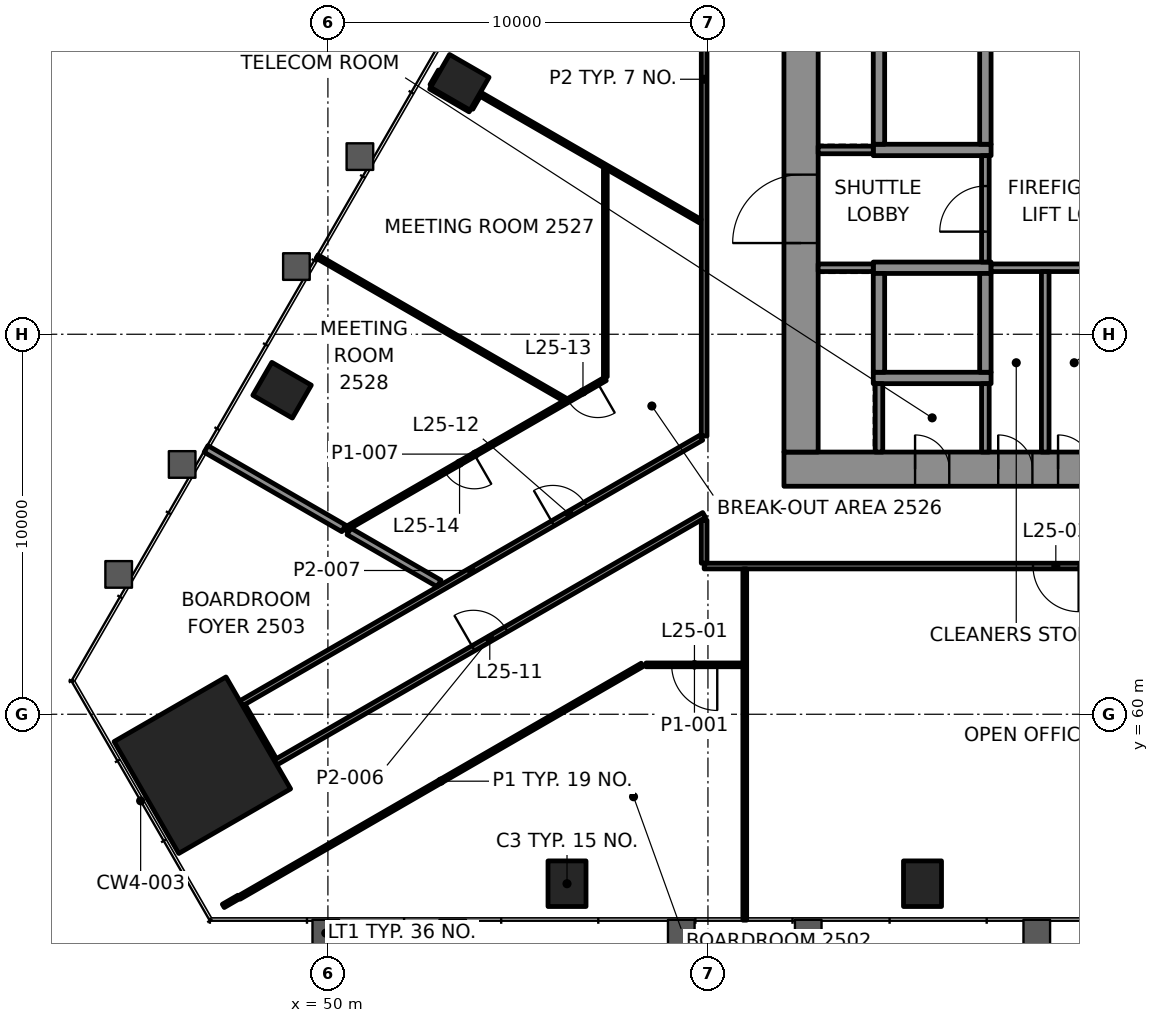
"""IFC4 building model, lengths in metres.
Left out: names, types, materials, properties, quantities, classifications, styles, units other than length and angle.
Written with IfcOpenShell. Run it as: python <this file> out.ifc"""

import sys

from ifc_helpers import new_model, si_unit, direction, frame, frame_2d, origin, origin_2d, place, context, subcontext, project, spatial, rectangle, extrude, element, fill, save


model = new_model("IFC4")
c1 = context("Model", 3, precision=1e-05, world=origin(), true_north=direction((0.0, 1.0)))
c2 = subcontext(c1, "Body", "Model", "MODEL_VIEW")
j1 = project(units=[si_unit("LENGTHUNIT", "METRE"), si_unit("PLANEANGLEUNIT", "RADIAN")], contexts=[c1])
p1 = place(None, origin())
s1 = spatial("IfcSite", under=j1, at=p1, CompositionType="ELEMENT")
p2 = place(p1, origin())
s2 = spatial("IfcBuilding", under=s1, at=p2, CompositionType="ELEMENT")
p3 = place(p2, frame((0.0, 0.0, 111.4)))
s3 = spatial("IfcBuildingStorey", under=s2, at=p3, CompositionType="ELEMENT", Elevation=111.4)
p4 = place(p3, frame((46.696, 58.659, 0.0), z_axis=(0.0, 0.0, 1.0), x_axis=(0.5, -0.866025403784, 0.0)))
e1 = element("IfcColumn", 1, at=p4, inside=s3, PredefinedType="COLUMN", context=c2, shape_type="SweptSolid", body=[
    extrude(rectangle(XDim=3.4, YDim=3.4, at=origin_2d()), origin(), (0.0, 0.0, 1.0), 4.2),
])
for number, where, z_axis, x_axis in (
    (2, (56.292, 55.541, -0.0), (0.0, 0.0, 1.0), (1.0, 0.0, 0.0)),
    (3, (65.646, 55.541, -0.0), (0.0, 0.0, 1.0), (1.0, 0.0, 0.0)),
    (4, (53.471, 76.628, -0.0), (0.0, 0.0, 1.0), (-0.5, -0.866, 0.0)),
    (5, (48.794, 68.528, -0.0), (0.0, 0.0, 1.0), (-0.5, -0.866, 0.0)),
):
    element("IfcColumn", number, at=place(p3, frame(where, z_axis=z_axis, x_axis=x_axis)), inside=s3, PredefinedType="COLUMN", context=c2, shape_type="SweptSolid", body=[
        extrude(rectangle(XDim=1.0, YDim=1.2, at=origin_2d()), origin(), (0.0, 0.0, 1.0), 4.2),
    ])
p5 = place(p3, frame((62.0, 66.45, 0.0), z_axis=(0.0, 0.0, 1.0), x_axis=(1.0, 0.0, 0.0)))
e6 = element("IfcWall", 6, at=p5, inside=s3, PredefinedType="SHEAR", context=c2, shape_type="SweptSolid", body=[
    extrude(rectangle(XDim=26.0, YDim=0.9, at=frame_2d((13.0, 0.0))), origin(), (0.0, 0.0, 1.0), 4.0),
])
p6 = place(p5, frame((3.45, 0.0, 0.0)))
e7 = element("IfcOpeningElement", 7, at=p6, cuts=e6, PredefinedType="OPENING", context=c2, shape_type="SweptSolid", body=[
    extrude(rectangle(XDim=0.9, YDim=2.1, at=frame_2d((0.45, 1.05))), frame((0.0, 0.46, 0.0), z_axis=(0.0, -1.0, 0.0), x_axis=(1.0, 0.0, 0.0)), (0.0, 0.0, 1.0), 0.92),
])
p7 = place(p5, frame((5.637, 0.0, 0.0)))
e8 = element("IfcOpeningElement", 8, at=p7, cuts=e6, PredefinedType="OPENING", context=c2, shape_type="SweptSolid", body=[
    extrude(rectangle(XDim=0.9, YDim=2.1, at=frame_2d((0.45, 1.05))), frame((0.0, 0.46, 0.0), z_axis=(0.0, -1.0, 0.0), x_axis=(1.0, 0.0, 0.0)), (0.0, 0.0, 1.0), 0.92),
])
p8 = place(p5, frame((7.212, 0.0, 0.0)))
e9 = element("IfcOpeningElement", 9, at=p8, cuts=e6, PredefinedType="OPENING", context=c2, shape_type="SweptSolid", body=[
    extrude(rectangle(XDim=0.9, YDim=2.1, at=frame_2d((0.45, 1.05))), frame((0.0, 0.46, 0.0), z_axis=(0.0, -1.0, 0.0), x_axis=(1.0, 0.0, 0.0)), (0.0, 0.0, 1.0), 0.92),
])
p9 = place(p5, frame((8.999, 0.0, 0.0)))
e10 = element("IfcOpeningElement", 10, at=p9, cuts=e6, PredefinedType="OPENING", context=c2, shape_type="SweptSolid", body=[
    extrude(rectangle(XDim=0.9, YDim=2.1, at=frame_2d((0.45, 1.05))), frame((0.0, 0.46, 0.0), z_axis=(0.0, -1.0, 0.0), x_axis=(1.0, 0.0, 0.0)), (0.0, 0.0, 1.0), 0.92),
])
p10 = place(p5, frame((17.324, 0.0, 0.0)))
e11 = element("IfcOpeningElement", 11, at=p10, cuts=e6, PredefinedType="OPENING", context=c2, shape_type="SweptSolid", body=[
    extrude(rectangle(XDim=0.9, YDim=2.1, at=frame_2d((0.45, 1.05))), frame((0.0, 0.46, 0.0), z_axis=(0.0, -1.0, 0.0), x_axis=(1.0, 0.0, 0.0)), (0.0, 0.0, 1.0), 0.92),
])
p11 = place(p3, frame((62.45, 66.9, 0.0), z_axis=(0.0, 0.0, 1.0), x_axis=(0.0, 1.0, 0.0)))
e12 = element("IfcWall", 12, at=p11, inside=s3, PredefinedType="SHEAR", context=c2, shape_type="SweptSolid", body=[
    extrude(rectangle(XDim=16.2, YDim=0.9, at=frame_2d((8.1, 0.0))), origin(), (0.0, 0.0, 1.0), 4.0),
])
p12 = place(p11, frame((5.5, 0.0, 0.0)))
e13 = element("IfcOpeningElement", 13, at=p12, cuts=e12, PredefinedType="OPENING", context=c2, shape_type="SweptSolid", body=[
    extrude(rectangle(XDim=1.8, YDim=2.1, at=frame_2d((0.9, 1.05))), frame((0.0, 0.46, 0.0), z_axis=(0.0, -1.0, 0.0), x_axis=(1.0, 0.0, 0.0)), (0.0, 0.0, 1.0), 0.92),
])
for number, where, z_axis, x_axis in (
    (14, (64.35, 68.85, 0.0), (0.0, 0.0, 1.0), (1.0, 0.0, 0.0)),
    (15, (64.35, 71.75, 0.0), (0.0, 0.0, 1.0), (1.0, 0.0, 0.0)),
    (16, (64.35, 74.85, 0.0), (0.0, 0.0, 1.0), (1.0, 0.0, 0.0)),
):
    element("IfcWall", number, at=place(p3, frame(where, z_axis=z_axis, x_axis=x_axis)), inside=s3, PredefinedType="SHEAR", context=c2, shape_type="SweptSolid", body=[
        extrude(rectangle(XDim=3.1, YDim=0.3, at=frame_2d((1.55, 0.0))), origin(), (0.0, 0.0, 1.0), 4.0),
    ])
for number, where, z_axis, x_axis in (
    (17, (64.5, 69.0, 0.0), (0.0, 0.0, 1.0), (0.0, 1.0, 0.0)),
    (18, (64.5, 75.0, 0.0), (0.0, 0.0, 1.0), (0.0, 1.0, 0.0)),
    (19, (67.3, 69.0, 0.0), (0.0, 0.0, 1.0), (0.0, 1.0, 0.0)),
    (20, (67.3, 75.0, 0.0), (0.0, 0.0, 1.0), (0.0, 1.0, 0.0)),
):
    element("IfcWall", number, at=place(p3, frame(where, z_axis=z_axis, x_axis=x_axis)), inside=s3, PredefinedType="SHEAR", context=c2, shape_type="SweptSolid", body=[
        extrude(rectangle(XDim=2.6, YDim=0.3, at=frame_2d((1.3, 0.0))), origin(), (0.0, 0.0, 1.0), 4.0),
    ])
p13 = place(p3, frame((60.919, 61.3, 0.0), z_axis=(0.0, 0.0, 1.0), x_axis=(-1.0, 0.0, 0.0)))
e21 = element("IfcWall", 21, at=p13, inside=s3, PredefinedType="PARTITIONING", context=c2, shape_type="SweptSolid", body=[
    extrude(rectangle(XDim=2.548, YDim=0.1, at=frame_2d((1.274, 0.0))), origin(), (0.0, 0.0, 1.0), 3.4),
])
p14 = place(p13, frame((0.674, 0.0, 0.0)))
e22 = element("IfcOpeningElement", 22, at=p14, cuts=e21, PredefinedType="OPENING", context=c2, shape_type="SweptSolid", body=[
    extrude(rectangle(XDim=1.2, YDim=2.1, at=frame_2d((0.6, 1.05))), frame((0.0, 0.06, 0.0), z_axis=(0.0, -1.0, 0.0), x_axis=(1.0, 0.0, 0.0)), (0.0, 0.0, 1.0), 0.12),
])
p15 = place(p3, frame((90.099, 63.9, 0.0), z_axis=(0.0, 0.0, 1.0), x_axis=(-1.0, 0.0, 0.0)))
e23 = element("IfcWall", 23, at=p15, inside=s3, PredefinedType="PARTITIONING", context=c2, shape_type="SweptSolid", body=[
    extrude(rectangle(XDim=30.199, YDim=0.15, at=frame_2d((15.099, 0.0))), origin(), (0.0, 0.0, 1.0), 3.4),
])
p16 = place(p15, frame((5.882, 0.0, 0.0)))
e24 = element("IfcOpeningElement", 24, at=p16, cuts=e23, PredefinedType="OPENING", context=c2, shape_type="SweptSolid", body=[
    extrude(rectangle(XDim=1.2, YDim=2.1, at=frame_2d((0.6, 1.05))), frame((0.0, 0.085, 0.0), z_axis=(0.0, -1.0, 0.0), x_axis=(1.0, 0.0, 0.0)), (0.0, 0.0, 1.0), 0.17),
])
p17 = place(p15, frame((20.346, 0.0, 0.0)))
e25 = element("IfcOpeningElement", 25, at=p17, cuts=e23, PredefinedType="OPENING", context=c2, shape_type="SweptSolid", body=[
    extrude(rectangle(XDim=1.2, YDim=2.1, at=frame_2d((0.6, 1.05))), frame((0.0, 0.085, 0.0), z_axis=(0.0, -1.0, 0.0), x_axis=(1.0, 0.0, 0.0)), (0.0, 0.0, 1.0), 0.17),
])
p18 = place(p3, frame((47.667, 55.178, 0.0), z_axis=(0.0, 0.0, 1.0), x_axis=(0.866022223021, 0.500005509203, 0.0)))
e26 = element("IfcWall", 26, at=p18, inside=s3, PredefinedType="PARTITIONING", context=c2, shape_type="SweptSolid", body=[
    extrude(rectangle(XDim=12.244, YDim=0.1, at=frame_2d((6.122, 0.0))), origin(), (0.0, 0.0, 1.0), 3.4),
])
p19 = place(p3, frame((47.248, 54.958, 0.0), z_axis=(0.0, 0.0, 1.0), x_axis=(0.865944638795, 0.50013986298, 0.0)))
e27 = element("IfcWall", 27, at=p19, inside=s3, PredefinedType="PARTITIONING", context=c2, shape_type="SweptSolid", body=[
    extrude(rectangle(XDim=0.472, YDim=0.1, at=frame_2d((0.236, 0.0))), origin(), (0.0, 0.0, 1.0), 3.4),
])
p20 = place(p3, frame((48.619, 58.73, 0.0), z_axis=(0.0, 0.0, 1.0), x_axis=(0.866022351388, 0.500005286868, 0.0)))
e28 = element("IfcWall", 28, at=p20, inside=s3, PredefinedType="PARTITIONING", context=c2, shape_type="SweptSolid", body=[
    extrude(rectangle(XDim=13.026, YDim=0.15, at=frame_2d((6.513, 0.0))), origin(), (0.0, 0.0, 1.0), 3.247),
])
p21 = place(p20, frame((6.013, 0.0, 0.0)))
e29 = element("IfcOpeningElement", 29, at=p21, cuts=e28, PredefinedType="OPENING", context=c2, shape_type="SweptSolid", body=[
    extrude(rectangle(XDim=1.0, YDim=2.1, at=frame_2d((0.5, 1.05))), frame((0.0, 0.085, 0.0), z_axis=(0.0, -1.0, 0.0), x_axis=(1.0, 0.0, 0.0)), (0.0, 0.0, 1.0), 0.17),
])
p22 = place(p3, frame((47.719, 60.289, 0.0), z_axis=(0.0, 0.0, 1.0), x_axis=(0.866025916507, 0.499999111938, 0.0)))
e30 = element("IfcWall", 30, at=p22, inside=s3, PredefinedType="PARTITIONING", context=c2, shape_type="SweptSolid", body=[
    extrude(rectangle(XDim=13.979, YDim=0.15, at=frame_2d((6.99, 0.0))), origin(), (0.0, 0.0, 1.0), 3.4),
])
p23 = place(p22, frame((9.467, 0.0, 0.0)))
e31 = element("IfcOpeningElement", 31, at=p23, cuts=e30, PredefinedType="OPENING", context=c2, shape_type="SweptSolid", body=[
    extrude(rectangle(XDim=1.0, YDim=2.1, at=frame_2d((0.5, 1.05))), frame((0.0, 0.085, 0.0), z_axis=(0.0, -1.0, 0.0), x_axis=(1.0, 0.0, 0.0)), (0.0, 0.0, 1.0), 0.17),
])
p24 = place(p3, frame((57.3, 68.823, 0.0), z_axis=(0.0, 0.0, 1.0), x_axis=(-0.866030292833, -0.499991531824, 0.0)))
e32 = element("IfcWall", 32, at=p24, inside=s3, PredefinedType="PARTITIONING", context=c2, shape_type="SweptSolid", body=[
    extrude(rectangle(XDim=7.906, YDim=0.1, at=frame_2d((3.953, 0.0))), origin(), (0.0, 0.0, 1.0), 3.4),
])
p25 = place(p24, frame((0.229, 0.0, 0.0)))
e33 = element("IfcOpeningElement", 33, at=p25, cuts=e32, PredefinedType="OPENING", context=c2, shape_type="SweptSolid", body=[
    extrude(rectangle(XDim=0.9, YDim=2.1, at=frame_2d((0.45, 1.05))), frame((0.0, 0.06, 0.0), z_axis=(0.0, -1.0, 0.0), x_axis=(1.0, 0.0, 0.0)), (0.0, 0.0, 1.0), 0.12),
])
p26 = place(p24, frame((3.979, 0.0, 0.0)))
e34 = element("IfcOpeningElement", 34, at=p26, cuts=e32, PredefinedType="OPENING", context=c2, shape_type="SweptSolid", body=[
    extrude(rectangle(XDim=0.9, YDim=2.1, at=frame_2d((0.45, 1.05))), frame((0.0, 0.06, 0.0), z_axis=(0.0, -1.0, 0.0), x_axis=(1.0, 0.0, 0.0)), (0.0, 0.0, 1.0), 0.12),
])
p27 = place(p3, frame((53.771, 75.948, 0.0), z_axis=(0.0, 0.0, 1.0), x_axis=(0.500246304613, 0.865883153041, 0.0)))
e35 = element("IfcWall", 35, at=p27, inside=s3, PredefinedType="PARTITIONING", context=c2, shape_type="SweptSolid", body=[
    extrude(rectangle(XDim=0.39, YDim=0.1, at=frame_2d((0.195, 0.0))), origin(), (0.0, 0.0, 1.0), 3.4),
])
p28 = place(p3, frame((52.73, 76.545, 0.0), z_axis=(0.0, 0.0, 1.0), x_axis=(0.49999285859, 0.86602952684, 0.0)))
e36 = element("IfcWall", 36, at=p28, inside=s3, PredefinedType="PARTITIONING", context=c2, shape_type="SweptSolid", body=[
    extrude(rectangle(XDim=0.443, YDim=0.1, at=frame_2d((0.221, 0.0))), origin(), (0.0, 0.0, 1.0), 3.4),
])
p29 = place(p3, frame((60.969, 54.581, 0.0), z_axis=(0.0, 0.0, 1.0), x_axis=(0.0, 1.0, 0.0)))
e37 = element("IfcWall", 37, at=p29, inside=s3, PredefinedType="PARTITIONING", context=c2, shape_type="SweptSolid", body=[
    extrude(rectangle(XDim=9.244, YDim=0.1, at=frame_2d((4.622, 0.0))), origin(), (0.0, 0.0, 1.0), 3.165),
])
p30 = place(p3, frame((59.9, 63.976, 0.0), z_axis=(0.0, 0.0, 1.0), x_axis=(0.0, 1.0, 0.0)))
e38 = element("IfcWall", 38, at=p30, inside=s3, PredefinedType="PARTITIONING", context=c2, shape_type="SweptSolid", body=[
    extrude(rectangle(XDim=1.131, YDim=0.15, at=frame_2d((0.565, 0.0))), origin(), (0.0, 0.0, 1.0), 3.247),
])
p31 = place(p3, frame((59.9, 67.321, 0.0), z_axis=(0.0, 0.0, 1.0), x_axis=(0.0, 1.0, 0.0)))
e39 = element("IfcWall", 39, at=p31, inside=s3, PredefinedType="PARTITIONING", context=c2, shape_type="SweptSolid", body=[
    extrude(rectangle(XDim=18.778, YDim=0.15, at=frame_2d((9.389, 0.0))), origin(), (0.0, 0.0, 1.0), 3.4),
])
p32 = place(p3, frame((57.3, 68.88, 0.0), z_axis=(0.0, 0.0, 1.0), x_axis=(0.0, 1.0, 0.0)))
e40 = element("IfcWall", 40, at=p32, inside=s3, PredefinedType="PARTITIONING", context=c2, shape_type="SweptSolid", body=[
    extrude(rectangle(XDim=5.45, YDim=0.1, at=frame_2d((2.725, 0.0))), origin(), (0.0, 0.0, 1.0), 3.4),
])
p33 = place(p3, frame((48.58, 58.794, 0.0), z_axis=(0.0, 0.0, 1.0), x_axis=(-0.499944585209, 0.866057395165, 0.0)))
e41 = element("IfcWall", 41, at=p33, inside=s3, PredefinedType="PARTITIONING", context=c2, shape_type="SweptSolid", body=[
    extrude(rectangle(XDim=1.649, YDim=0.15, at=frame_2d((0.825, 0.0))), origin(), (0.0, 0.0, 1.0), 3.247),
])
p34 = place(p3, frame((59.799, 72.975, 0.0), z_axis=(0.0, 0.0, 1.0), x_axis=(-0.866037071789, 0.499979789879, 0.0)))
e42 = element("IfcWall", 42, at=p34, inside=s3, PredefinedType="PARTITIONING", context=c2, shape_type="SweptSolid", body=[
    extrude(rectangle(XDim=6.707, YDim=0.1, at=frame_2d((3.354, 0.0))), origin(), (0.0, 0.0, 1.0), 3.4),
])
p35 = place(p3, frame((53.741, 75.896, 0.0), z_axis=(0.0, 0.0, 1.0), x_axis=(-0.866094119867, 0.499880961361, 0.0)))
e43 = element("IfcWall", 43, at=p35, inside=s3, PredefinedType="PARTITIONING", context=c2, shape_type="SweptSolid", body=[
    extrude(rectangle(XDim=1.2, YDim=0.1, at=frame_2d((0.6, 0.0))), origin(), (0.0, 0.0, 1.0), 3.165),
])
p36 = place(p3, frame((56.223, 68.288, 0.0), z_axis=(0.0, 0.0, 1.0), x_axis=(-0.866018922649, 0.500011225488, 0.0)))
e44 = element("IfcWall", 44, at=p36, inside=s3, PredefinedType="PARTITIONING", context=c2, shape_type="SweptSolid", body=[
    extrude(rectangle(XDim=7.513, YDim=0.1, at=frame_2d((3.757, 0.0))), origin(), (0.0, 0.0, 1.0), 3.165),
])
p37 = place(p3, frame((52.926, 63.441, 0.0), z_axis=(0.0, 0.0, 1.0), x_axis=(-0.866019409031, 0.500010383074, 0.0)))
e45 = element("IfcWall", 45, at=p37, inside=s3, PredefinedType="PARTITIONING", context=c2, shape_type="SweptSolid", body=[
    extrude(rectangle(XDim=2.74, YDim=0.2, at=frame_2d((1.37, 0.0))), origin(), (0.0, 0.0, 1.0), 3.4),
])
p38 = place(p3, frame((50.416, 64.891, 0.0), z_axis=(0.0, 0.0, 1.0), x_axis=(-0.866054366634, 0.499949831517, 0.0)))
e46 = element("IfcWall", 46, at=p38, inside=s3, PredefinedType="PARTITIONING", context=c2, shape_type="SweptSolid", body=[
    extrude(rectangle(XDim=4.183, YDim=0.2, at=frame_2d((2.091, 0.0))), origin(), (0.0, 0.0, 1.0), 3.4),
])
p39 = place(p3, frame((62.9, 71.75, 0.0), z_axis=(0.0, 0.0, 1.0), x_axis=(1.0, 0.0, 0.0)))
e47 = element("IfcWall", 47, at=p39, inside=s3, PredefinedType="PARTITIONING", context=c2, shape_type="SweptSolid", body=[
    extrude(rectangle(XDim=1.45, YDim=0.2, at=frame_2d((0.725, 0.0))), origin(), (0.0, 0.0, 1.0), 4.0),
])
p40 = place(p3, frame((67.45, 71.75, 0.0), z_axis=(0.0, 0.0, 1.0), x_axis=(1.0, 0.0, 0.0)))
e48 = element("IfcWall", 48, at=p40, inside=s3, PredefinedType="PARTITIONING", context=c2, shape_type="SweptSolid", body=[
    extrude(rectangle(XDim=2.85, YDim=0.2, at=frame_2d((1.425, 0.0))), origin(), (0.0, 0.0, 1.0), 4.0),
])
p41 = place(p3, frame((62.9, 74.85, 0.0), z_axis=(0.0, 0.0, 1.0), x_axis=(1.0, 0.0, 0.0)))
e49 = element("IfcWall", 49, at=p41, inside=s3, PredefinedType="PARTITIONING", context=c2, shape_type="SweptSolid", body=[
    extrude(rectangle(XDim=1.45, YDim=0.2, at=frame_2d((0.725, 0.0))), origin(), (0.0, 0.0, 1.0), 4.0),
])
for number, where, z_axis, x_axis in (
    (50, (64.5, 66.9, 0.0), (0.0, 0.0, 1.0), (0.0, 1.0, 0.0)),
    (51, (67.3, 66.9, 0.0), (0.0, 0.0, 1.0), (0.0, 1.0, 0.0)),
):
    element("IfcWall", number, at=place(p3, frame(where, z_axis=z_axis, x_axis=x_axis)), inside=s3, PredefinedType="PARTITIONING", context=c2, shape_type="SweptSolid", body=[
        extrude(rectangle(XDim=1.8, YDim=0.2, at=frame_2d((0.9, 0.0))), origin(), (0.0, 0.0, 1.0), 4.0),
    ])
p42 = place(p3, frame((67.3, 71.9, 0.0), z_axis=(0.0, 0.0, 1.0), x_axis=(0.0, 1.0, 0.0)))
e52 = element("IfcWall", 52, at=p42, inside=s3, PredefinedType="PARTITIONING", context=c2, shape_type="SweptSolid", body=[
    extrude(rectangle(XDim=2.8, YDim=0.2, at=frame_2d((1.4, 0.0))), origin(), (0.0, 0.0, 1.0), 4.0),
])
p43 = place(p42, frame((0.8, 0.0, 0.0)))
e53 = element("IfcOpeningElement", 53, at=p43, cuts=e52, PredefinedType="OPENING", context=c2, shape_type="SweptSolid", body=[
    extrude(rectangle(XDim=1.2, YDim=2.1, at=frame_2d((0.6, 1.05))), frame((0.0, 0.11, 0.0), z_axis=(0.0, -1.0, 0.0), x_axis=(1.0, 0.0, 0.0)), (0.0, 0.0, 1.0), 0.22),
])
p44 = place(p3, frame((68.875, 66.9, 0.0), z_axis=(0.0, 0.0, 1.0), x_axis=(0.0, 1.0, 0.0)))
e54 = element("IfcWall", 54, at=p44, inside=s3, PredefinedType="PARTITIONING", context=c2, shape_type="SweptSolid", body=[
    extrude(rectangle(XDim=4.75, YDim=0.2, at=frame_2d((2.375, 0.0))), origin(), (0.0, 0.0, 1.0), 4.0),
])
p45 = place(p14, origin())
e55 = element("IfcDoor", 55, at=p45, inside=s3, OperationType="DOUBLE_DOOR_SINGLE_SWING", PredefinedType="DOOR", context=c2, shape_type="SweptSolid", body=[
    extrude(rectangle(XDim=1.2, YDim=2.1, at=frame_2d((0.6, 1.05))), frame((0.0, 0.025, 0.0), z_axis=(0.0, -1.0, 0.0), x_axis=(1.0, 0.0, 0.0)), (0.0, 0.0, 1.0), 0.05),
])
fill(e22, e55)
p46 = place(p17, origin())
e56 = element("IfcDoor", 56, at=p46, inside=s3, OperationType="DOUBLE_DOOR_SINGLE_SWING", PredefinedType="DOOR", context=c2, shape_type="SweptSolid", body=[
    extrude(rectangle(XDim=1.2, YDim=2.1, at=frame_2d((0.6, 1.05))), frame((0.0, 0.025, 0.0), z_axis=(0.0, -1.0, 0.0), x_axis=(1.0, 0.0, 0.0)), (0.0, 0.0, 1.0), 0.05),
])
fill(e25, e56)
p47 = place(p21, origin())
e57 = element("IfcDoor", 57, at=p47, inside=s3, OperationType="SINGLE_SWING_RIGHT", PredefinedType="DOOR", context=c2, shape_type="SweptSolid", body=[
    extrude(rectangle(XDim=1.0, YDim=2.1, at=frame_2d((0.5, 1.05))), frame((0.0, 0.025, 0.0), z_axis=(0.0, -1.0, 0.0), x_axis=(1.0, 0.0, 0.0)), (0.0, 0.0, 1.0), 0.05),
])
fill(e29, e57)
p48 = place(p23, origin())
e58 = element("IfcDoor", 58, at=p48, inside=s3, OperationType="SINGLE_SWING_LEFT", PredefinedType="DOOR", context=c2, shape_type="SweptSolid", body=[
    extrude(rectangle(XDim=1.0, YDim=2.1, at=frame_2d((0.5, 1.05))), frame((0.0, 0.025, 0.0), z_axis=(0.0, -1.0, 0.0), x_axis=(1.0, 0.0, 0.0)), (0.0, 0.0, 1.0), 0.05),
])
fill(e31, e58)
p49 = place(p25, origin())
e59 = element("IfcDoor", 59, at=p49, inside=s3, OperationType="SINGLE_SWING_LEFT", PredefinedType="DOOR", context=c2, shape_type="SweptSolid", body=[
    extrude(rectangle(XDim=0.9, YDim=2.1, at=frame_2d((0.45, 1.05))), frame((0.0, 0.025, 0.0), z_axis=(0.0, -1.0, 0.0), x_axis=(1.0, 0.0, 0.0)), (0.0, 0.0, 1.0), 0.05),
])
fill(e33, e59)
p50 = place(p26, origin())
e60 = element("IfcDoor", 60, at=p50, inside=s3, OperationType="SINGLE_SWING_RIGHT", PredefinedType="DOOR", context=c2, shape_type="SweptSolid", body=[
    extrude(rectangle(XDim=0.9, YDim=2.1, at=frame_2d((0.45, 1.05))), frame((0.0, 0.025, 0.0), z_axis=(0.0, -1.0, 0.0), x_axis=(1.0, 0.0, 0.0)), (0.0, 0.0, 1.0), 0.05),
])
fill(e34, e60)
p51 = place(p43, origin())
e61 = element("IfcDoor", 61, at=p51, inside=s3, OperationType="SINGLE_SWING_RIGHT", PredefinedType="DOOR", context=c2, shape_type="SweptSolid", body=[
    extrude(rectangle(XDim=1.2, YDim=2.1, at=frame_2d((0.6, 1.05))), frame((0.0, 0.025, 0.0), z_axis=(0.0, -1.0, 0.0), x_axis=(1.0, 0.0, 0.0)), (0.0, 0.0, 1.0), 0.05),
])
fill(e53, e61)
p52 = place(p12, origin())
e62 = element("IfcDoor", 62, at=p52, inside=s3, OperationType="SINGLE_SWING_LEFT", PredefinedType="DOOR", context=c2, shape_type="SweptSolid", body=[
    extrude(rectangle(XDim=1.8, YDim=2.1, at=frame_2d((0.9, 1.05))), frame((0.0, 0.17, 0.0), z_axis=(0.0, -1.0, 0.0), x_axis=(1.0, 0.0, 0.0)), (0.0, 0.0, 1.0), 0.34),
])
fill(e13, e62)
p53 = place(p6, origin())
e63 = element("IfcDoor", 63, at=p53, inside=s3, OperationType="SINGLE_SWING_LEFT", PredefinedType="DOOR", context=c2, shape_type="SweptSolid", body=[
    extrude(rectangle(XDim=0.9, YDim=2.1, at=frame_2d((0.45, 1.05))), frame((0.0, 0.17, 0.0), z_axis=(0.0, -1.0, 0.0), x_axis=(1.0, 0.0, 0.0)), (0.0, 0.0, 1.0), 0.34),
])
fill(e7, e63)
p54 = place(p7, origin())
e64 = element("IfcDoor", 64, at=p54, inside=s3, OperationType="SINGLE_SWING_RIGHT", PredefinedType="DOOR", context=c2, shape_type="SweptSolid", body=[
    extrude(rectangle(XDim=0.9, YDim=2.1, at=frame_2d((0.45, 1.05))), frame((0.0, 0.17, 0.0), z_axis=(0.0, -1.0, 0.0), x_axis=(1.0, 0.0, 0.0)), (0.0, 0.0, 1.0), 0.34),
])
fill(e8, e64)
p55 = place(p8, origin())
e65 = element("IfcDoor", 65, at=p55, inside=s3, OperationType="SINGLE_SWING_LEFT", PredefinedType="DOOR", context=c2, shape_type="SweptSolid", body=[
    extrude(rectangle(XDim=0.9, YDim=2.1, at=frame_2d((0.45, 1.05))), frame((0.0, 0.17, 0.0), z_axis=(0.0, -1.0, 0.0), x_axis=(1.0, 0.0, 0.0)), (0.0, 0.0, 1.0), 0.34),
])
fill(e9, e65)
save(model, sys.argv[1])
